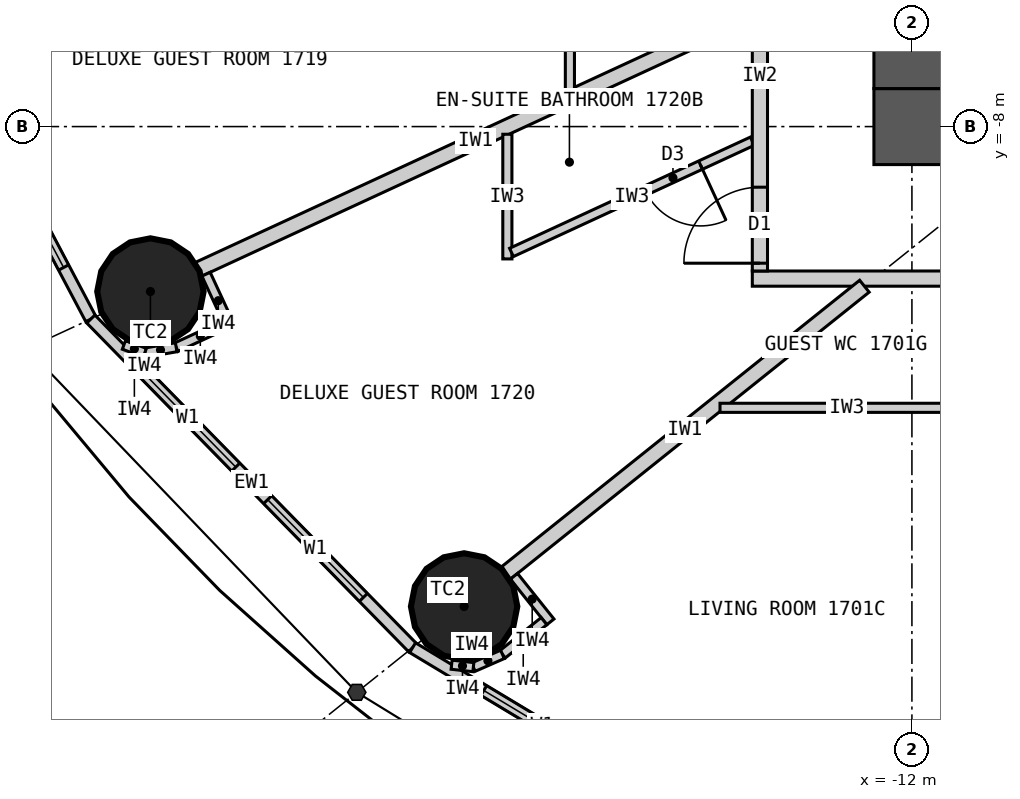
"""IFC4 building model, lengths in metres.
Left out: names, types, materials, properties, quantities, classifications, styles, units other than length and angle.
Written with IfcOpenShell. Run it as: python <this file> out.ifc"""

import sys

from ifc_helpers import new_model, si_unit, direction, frame, frame_2d, origin, origin_2d, place, context, subcontext, project, spatial, rectangle, circle, extrude, element, fill, save


model = new_model("IFC4")
c1 = context("Model", 3, precision=1e-05, world=origin(), true_north=direction((0.0, 1.0)))
c2 = subcontext(c1, "Body", "Model", "MODEL_VIEW")
j1 = project(units=[si_unit("LENGTHUNIT", "METRE"), si_unit("PLANEANGLEUNIT", "RADIAN")], contexts=[c1])
p1 = place(None, origin())
s1 = spatial("IfcSite", under=j1, at=p1, CompositionType="ELEMENT")
p2 = place(p1, origin())
s2 = spatial("IfcBuilding", under=s1, at=p2, CompositionType="ELEMENT")
p3 = place(p2, frame((0.0, 0.0, 70.5)))
s3 = spatial("IfcBuildingStorey", under=s2, at=p3, CompositionType="ELEMENT", Elevation=70.5)
for number, where, z_axis, x_axis in (
    (1, (-22.019, -10.17, 0.0), (0.0, 0.0, 1.0), (1.0, 0.0, 0.0)),
    (2, (-17.892, -14.313, 0.0), (0.0, 0.0, 1.0), (1.0, 0.0, 0.0)),
):
    element("IfcColumn", number, at=place(p3, frame(where, z_axis=z_axis, x_axis=x_axis)), inside=s3, PredefinedType="COLUMN", context=c2, shape_type="SweptSolid", body=[
        extrude(circle(Radius=0.7, at=origin_2d()), origin(), (0.0, 0.0, 1.0), 3.3),
    ])
p4 = place(p3, frame((12.5, -8.0, 0.0), z_axis=(0.0, 0.0, 1.0), x_axis=(-1.0, 0.0, 0.0)))
e3 = element("IfcWall", 3, at=p4, inside=s3, PredefinedType="SHEAR", context=c2, shape_type="SweptSolid", body=[
    extrude(rectangle(XDim=25.0, YDim=1.0, at=frame_2d((12.5, 0.0))), origin(), (0.0, 0.0, 1.0), 3.3),
])
p5 = place(p4, frame((11.2, 0.0, 0.0)))
e4 = element("IfcOpeningElement", 4, at=p5, cuts=e3, PredefinedType="OPENING", context=c2, shape_type="SweptSolid", body=[
    extrude(rectangle(XDim=1.2, YDim=2.2, at=frame_2d((0.6, 1.1))), frame((0.0, 0.51, 0.0), z_axis=(0.0, -1.0, 0.0), x_axis=(1.0, 0.0, 0.0)), (0.0, 0.0, 1.0), 1.02),
])
p6 = place(p4, frame((18.8, 0.0, 0.0)))
e5 = element("IfcOpeningElement", 5, at=p6, cuts=e3, PredefinedType="OPENING", context=c2, shape_type="SweptSolid", body=[
    extrude(rectangle(XDim=0.9, YDim=2.2, at=frame_2d((0.45, 1.1))), frame((0.0, 0.51, 0.0), z_axis=(0.0, -1.0, 0.0), x_axis=(1.0, 0.0, 0.0)), (0.0, 0.0, 1.0), 1.02),
])
p7 = place(p3, frame((-12.0, 7.5, 0.0), z_axis=(0.0, 0.0, 1.0), x_axis=(0.0, -1.0, 0.0)))
e6 = element("IfcWall", 6, at=p7, inside=s3, PredefinedType="SHEAR", context=c2, shape_type="SweptSolid", body=[
    extrude(rectangle(XDim=15.0, YDim=1.0, at=frame_2d((7.5, 0.0))), origin(), (0.0, 0.0, 1.0), 3.3),
])
p8 = place(p7, frame((6.6, 0.0, 0.0)))
e7 = element("IfcOpeningElement", 7, at=p8, cuts=e6, PredefinedType="OPENING", context=c2, shape_type="SweptSolid", body=[
    extrude(rectangle(XDim=1.8, YDim=2.2, at=frame_2d((0.9, 1.1))), frame((0.0, 0.51, 0.0), z_axis=(0.0, -1.0, 0.0), x_axis=(1.0, 0.0, 0.0)), (0.0, 0.0, 1.0), 1.02),
])
p9 = place(p3, frame((-25.482, -5.462, 0.0), z_axis=(0.0, 0.0, 1.0), x_axis=(0.467296867008, -0.884100468321, 0.0)))
e8 = element("IfcWall", 8, at=p9, inside=s3, PredefinedType="ELEMENTEDWALL", context=c2, shape_type="SweptSolid", body=[
    extrude(rectangle(XDim=5.734, YDim=0.15, at=frame_2d((2.867, 0.0))), origin(), (0.0, 0.0, 1.0), 3.12),
])
p10 = place(p9, frame((0.767, 0.0, 0.9)))
e9 = element("IfcOpeningElement", 9, at=p10, cuts=e8, PredefinedType="OPENING", context=c2, shape_type="SweptSolid", body=[
    extrude(rectangle(XDim=1.8, YDim=1.9, at=frame_2d((0.9, 0.95))), frame((0.0, 0.085, 0.0), z_axis=(0.0, -1.0, 0.0), x_axis=(1.0, 0.0, 0.0)), (0.0, 0.0, 1.0), 0.17),
])
p11 = place(p9, frame((3.167, 0.0, 0.9)))
e10 = element("IfcOpeningElement", 10, at=p11, cuts=e8, PredefinedType="OPENING", context=c2, shape_type="SweptSolid", body=[
    extrude(rectangle(XDim=1.8, YDim=1.9, at=frame_2d((0.9, 0.95))), frame((0.0, 0.085, 0.0), z_axis=(0.0, -1.0, 0.0), x_axis=(1.0, 0.0, 0.0)), (0.0, 0.0, 1.0), 0.17),
])
p12 = place(p3, frame((-22.803, -10.532, 0.0), z_axis=(0.0, 0.0, 1.0), x_axis=(0.699602905915, -0.714531856557, 0.0)))
e11 = element("IfcWall", 11, at=p12, inside=s3, PredefinedType="ELEMENTEDWALL", context=c2, shape_type="SweptSolid", body=[
    extrude(rectangle(XDim=6.051, YDim=0.15, at=frame_2d((3.025, 0.0))), origin(), (0.0, 0.0, 1.0), 3.12),
])
p13 = place(p12, frame((0.926, 0.0, 0.9)))
e12 = element("IfcOpeningElement", 12, at=p13, cuts=e11, PredefinedType="OPENING", context=c2, shape_type="SweptSolid", body=[
    extrude(rectangle(XDim=1.8, YDim=1.9, at=frame_2d((0.9, 0.95))), frame((0.0, 0.085, 0.0), z_axis=(0.0, -1.0, 0.0), x_axis=(1.0, 0.0, 0.0)), (0.0, 0.0, 1.0), 0.17),
])
p14 = place(p12, frame((3.325, 0.0, 0.9)))
e13 = element("IfcOpeningElement", 13, at=p14, cuts=e11, PredefinedType="OPENING", context=c2, shape_type="SweptSolid", body=[
    extrude(rectangle(XDim=1.8, YDim=1.9, at=frame_2d((0.9, 0.95))), frame((0.0, 0.085, 0.0), z_axis=(0.0, -1.0, 0.0), x_axis=(1.0, 0.0, 0.0)), (0.0, 0.0, 1.0), 0.17),
])
p15 = place(p3, frame((-18.57, -14.856, 0.0), z_axis=(0.0, 0.0, 1.0), x_axis=(0.856983180864, -0.515344377787, 0.0)))
e14 = element("IfcWall", 14, at=p15, inside=s3, PredefinedType="ELEMENTEDWALL", context=c2, shape_type="SweptSolid", body=[
    extrude(rectangle(XDim=6.386, YDim=0.15, at=frame_2d((3.193, 0.0))), origin(), (0.0, 0.0, 1.0), 3.12),
])
p16 = place(p15, frame((1.093, 0.0, 0.9)))
e15 = element("IfcOpeningElement", 15, at=p16, cuts=e14, PredefinedType="OPENING", context=c2, shape_type="SweptSolid", body=[
    extrude(rectangle(XDim=1.8, YDim=1.9, at=frame_2d((0.9, 0.95))), frame((0.0, 0.085, 0.0), z_axis=(0.0, -1.0, 0.0), x_axis=(1.0, 0.0, 0.0)), (0.0, 0.0, 1.0), 0.17),
])
p17 = place(p15, frame((3.493, 0.0, 0.9)))
e16 = element("IfcOpeningElement", 16, at=p17, cuts=e14, PredefinedType="OPENING", context=c2, shape_type="SweptSolid", body=[
    extrude(rectangle(XDim=1.8, YDim=1.9, at=frame_2d((0.9, 0.95))), frame((0.0, 0.085, 0.0), z_axis=(0.0, -1.0, 0.0), x_axis=(1.0, 0.0, 0.0)), (0.0, 0.0, 1.0), 0.17),
])
p18 = place(p3, frame((14.1, -10.0, 0.0), z_axis=(0.0, 0.0, 1.0), x_axis=(-1.0, 0.0, 0.0)))
e17 = element("IfcWall", 17, at=p18, inside=s3, PredefinedType="PARTITIONING", context=c2, shape_type="SweptSolid", body=[
    extrude(rectangle(XDim=28.2, YDim=0.2, at=frame_2d((14.1, 0.0))), origin(), (0.0, 0.0, 1.0), 3.12),
])
p19 = place(p18, frame((24.165, 0.0, 0.0)))
e18 = element("IfcOpeningElement", 18, at=p19, cuts=e17, PredefinedType="OPENING", context=c2, shape_type="SweptSolid", body=[
    extrude(rectangle(XDim=1.0, YDim=2.2, at=frame_2d((0.5, 1.1))), frame((0.0, 0.11, 0.0), z_axis=(0.0, -1.0, 0.0), x_axis=(1.0, 0.0, 0.0)), (0.0, 0.0, 1.0), 0.22),
])
p20 = place(p18, frame((14.923, 0.0, 0.0)))
e19 = element("IfcOpeningElement", 19, at=p20, cuts=e17, PredefinedType="OPENING", context=c2, shape_type="SweptSolid", body=[
    extrude(rectangle(XDim=1.0, YDim=2.2, at=frame_2d((0.5, 1.1))), frame((0.0, 0.11, 0.0), z_axis=(0.0, -1.0, 0.0), x_axis=(1.0, 0.0, 0.0)), (0.0, 0.0, 1.0), 0.22),
])
p21 = place(p18, frame((3.035, 0.0, 0.0)))
e20 = element("IfcOpeningElement", 20, at=p21, cuts=e17, PredefinedType="OPENING", context=c2, shape_type="SweptSolid", body=[
    extrude(rectangle(XDim=1.0, YDim=2.2, at=frame_2d((0.5, 1.1))), frame((0.0, 0.11, 0.0), z_axis=(0.0, -1.0, 0.0), x_axis=(1.0, 0.0, 0.0)), (0.0, 0.0, 1.0), 0.22),
])
p22 = place(p3, frame((-14.1, -6.512, 0.0), z_axis=(0.0, 0.0, 1.0), x_axis=(-0.907832871056, -0.419332181247, 0.0)))
e21 = element("IfcWall", 21, at=p22, inside=s3, PredefinedType="PARTITIONING", context=c2, shape_type="SweptSolid", body=[
    extrude(rectangle(XDim=8.023, YDim=0.2, at=frame_2d((4.011, 0.0))), origin(), (0.0, 0.0, 1.0), 2.32),
])
p23 = place(p3, frame((-12.625, -10.1, 0.0), z_axis=(0.0, 0.0, 1.0), x_axis=(-0.780892451574, -0.624665493744, 0.0)))
e22 = element("IfcWall", 22, at=p23, inside=s3, PredefinedType="PARTITIONING", context=c2, shape_type="SweptSolid", body=[
    extrude(rectangle(XDim=6.045, YDim=0.2, at=frame_2d((3.022, 0.0))), origin(), (0.0, 0.0, 1.0), 2.32),
])
p24 = place(p3, frame((-7.289, -10.1, 0.0), z_axis=(0.0, 0.0, 1.0), x_axis=(-0.585198353053, -0.810890182197, 0.0)))
e23 = element("IfcWall", 23, at=p24, inside=s3, PredefinedType="PARTITIONING", context=c2, shape_type="SweptSolid", body=[
    extrude(rectangle(XDim=8.36, YDim=0.2, at=frame_2d((4.18, 0.0))), origin(), (0.0, 0.0, 1.0), 2.32),
])
p25 = place(p24, frame((0.72, 0.0, 0.0)))
e24 = element("IfcOpeningElement", 24, at=p25, cuts=e23, PredefinedType="OPENING", context=c2, shape_type="SweptSolid", body=[
    extrude(rectangle(XDim=0.9, YDim=2.1, at=frame_2d((0.45, 1.05))), frame((0.0, 0.11, 0.0), z_axis=(0.0, -1.0, 0.0), x_axis=(1.0, 0.0, 0.0)), (0.0, 0.0, 1.0), 0.22),
])
p26 = place(p3, frame((-14.525, -11.7, 0.0), z_axis=(0.0, 0.0, 1.0), x_axis=(1.0, 0.0, 0.0)))
e25 = element("IfcWall", 25, at=p26, inside=s3, PredefinedType="PARTITIONING", context=c2, shape_type="SweptSolid", body=[
    extrude(rectangle(XDim=3.34, YDim=0.12, at=frame_2d((1.67, 0.0))), origin(), (0.0, 0.0, 1.0), 3.12),
])
p27 = place(p3, frame((-16.5, -7.521, 0.0), z_axis=(0.0, 0.0, 1.0), x_axis=(0.0, 1.0, 0.0)))
e26 = element("IfcWall", 26, at=p27, inside=s3, PredefinedType="PARTITIONING", context=c2, shape_type="SweptSolid", body=[
    extrude(rectangle(XDim=2.749, YDim=0.12, at=frame_2d((1.374, 0.0))), origin(), (0.0, 0.0, 1.0), 3.12),
])
p28 = place(p3, frame((-17.323, -8.101, 0.0), z_axis=(0.0, 0.0, 1.0), x_axis=(0.0, -1.0, 0.0)))
e27 = element("IfcWall", 27, at=p28, inside=s3, PredefinedType="PARTITIONING", context=c2, shape_type="SweptSolid", body=[
    extrude(rectangle(XDim=1.64, YDim=0.12, at=frame_2d((0.82, 0.0))), origin(), (0.0, 0.0, 1.0), 3.12),
])
p29 = place(p3, frame((-14.1, -8.193, 0.0), z_axis=(0.0, 0.0, 1.0), x_axis=(-0.907836493557, -0.419324338628, 0.0)))
e28 = element("IfcWall", 28, at=p29, inside=s3, PredefinedType="PARTITIONING", context=c2, shape_type="SweptSolid", body=[
    extrude(rectangle(XDim=3.49, YDim=0.12, at=frame_2d((1.745, 0.0))), origin(), (0.0, 0.0, 1.0), 3.12),
])
p30 = place(p29, frame((0.75, 0.0, 0.0)))
e29 = element("IfcOpeningElement", 29, at=p30, cuts=e28, PredefinedType="OPENING", context=c2, shape_type="SweptSolid", body=[
    extrude(rectangle(XDim=0.8, YDim=2.1, at=frame_2d((0.4, 1.05))), frame((0.0, 0.07, 0.0), z_axis=(0.0, -1.0, 0.0), x_axis=(1.0, 0.0, 0.0)), (0.0, 0.0, 1.0), 0.14),
])
p31 = place(p3, frame((-14.0, -4.772, 0.0), z_axis=(0.0, 0.0, 1.0), x_axis=(0.0, -1.0, 0.0)))
e30 = element("IfcWall", 30, at=p31, inside=s3, PredefinedType="PARTITIONING", context=c2, shape_type="SweptSolid", body=[
    extrude(rectangle(XDim=5.127, YDim=0.2, at=frame_2d((2.564, 0.0))), origin(), (0.0, 0.0, 1.0), 3.12),
])
p32 = place(p31, frame((4.025, 0.0, 0.0)))
e31 = element("IfcOpeningElement", 31, at=p32, cuts=e30, PredefinedType="OPENING", context=c2, shape_type="SweptSolid", body=[
    extrude(rectangle(XDim=1.0, YDim=2.2, at=frame_2d((0.5, 1.1))), frame((0.0, 0.11, 0.0), z_axis=(0.0, -1.0, 0.0), x_axis=(1.0, 0.0, 0.0)), (0.0, 0.0, 1.0), 0.22),
])
p33 = place(p3, frame((-21.287, -9.942, 0.0), z_axis=(0.0, 0.0, 1.0), x_axis=(0.419259891039, -0.907866258744, 0.0)))
e32 = element("IfcWall", 32, at=p33, inside=s3, PredefinedType="PARTITIONING", context=c2, shape_type="SweptSolid", body=[
    extrude(rectangle(XDim=0.768, YDim=0.12, at=frame_2d((0.384, 0.0))), origin(), (0.0, 0.0, 1.0), 3.12),
])
p34 = place(p3, frame((-21.045, -10.61, 0.0), z_axis=(0.0, 0.0, 1.0), x_axis=(-0.907877701396, -0.419235112208, 0.0)))
e33 = element("IfcWall", 33, at=p34, inside=s3, PredefinedType="PARTITIONING", context=c2, shape_type="SweptSolid", body=[
    extrude(rectangle(XDim=0.7, YDim=0.12, at=frame_2d((0.35, 0.0))), origin(), (0.0, 0.0, 1.0), 3.12),
])
p35 = place(p3, frame((-21.68, -10.903, 0.0), z_axis=(0.0, 0.0, 1.0), x_axis=(-0.985446622073, -0.169985161247, 0.0)))
e34 = element("IfcWall", 34, at=p35, inside=s3, PredefinedType="PARTITIONING", context=c2, shape_type="SweptSolid", body=[
    extrude(rectangle(XDim=0.418, YDim=0.12, at=frame_2d((0.209, 0.0))), origin(), (0.0, 0.0, 1.0), 3.12),
])
p36 = place(p3, frame((-22.092, -10.974, 0.0), z_axis=(0.0, 0.0, 1.0), x_axis=(-0.938428160676, 0.345474437912, 0.0)))
e35 = element("IfcWall", 35, at=p36, inside=s3, PredefinedType="PARTITIONING", context=c2, shape_type="SweptSolid", body=[
    extrude(rectangle(XDim=0.294, YDim=0.12, at=frame_2d((0.147, 0.0))), origin(), (0.0, 0.0, 1.0), 3.12),
])
p37 = place(p3, frame((-17.236, -13.917, 0.0), z_axis=(0.0, 0.0, 1.0), x_axis=(0.624695047554, -0.780868809443, 0.0)))
e36 = element("IfcWall", 36, at=p37, inside=s3, PredefinedType="PARTITIONING", context=c2, shape_type="SweptSolid", body=[
    extrude(rectangle(XDim=0.768, YDim=0.12, at=frame_2d((0.384, 0.0))), origin(), (0.0, 0.0, 1.0), 3.12),
])
p38 = place(p3, frame((-16.841, -14.507, 0.0), z_axis=(0.0, 0.0, 1.0), x_axis=(-0.780902834923, -0.62465251333, 0.0)))
e37 = element("IfcWall", 37, at=p38, inside=s3, PredefinedType="PARTITIONING", context=c2, shape_type="SweptSolid", body=[
    extrude(rectangle(XDim=0.7, YDim=0.12, at=frame_2d((0.35, 0.0))), origin(), (0.0, 0.0, 1.0), 3.12),
])
p39 = place(p3, frame((-17.387, -14.944, 0.0), z_axis=(0.0, 0.0, 1.0), x_axis=(-0.916036698064, -0.401094462441, 0.0)))
e38 = element("IfcWall", 38, at=p39, inside=s3, PredefinedType="PARTITIONING", context=c2, shape_type="SweptSolid", body=[
    extrude(rectangle(XDim=0.418, YDim=0.12, at=frame_2d((0.209, 0.0))), origin(), (0.0, 0.0, 1.0), 3.12),
])
p40 = place(p3, frame((-17.77, -15.112, 0.0), z_axis=(0.0, 0.0, 1.0), x_axis=(-0.993904401174, 0.110245368731, 0.0)))
e39 = element("IfcWall", 39, at=p40, inside=s3, PredefinedType="PARTITIONING", context=c2, shape_type="SweptSolid", body=[
    extrude(rectangle(XDim=0.288, YDim=0.12, at=frame_2d((0.144, 0.0))), origin(), (0.0, 0.0, 1.0), 3.12),
])
p41 = place(p11, origin())
e40 = element("IfcWindow", 40, at=p41, inside=s3, PartitioningType="SINGLE_PANEL", PredefinedType="WINDOW", context=c2, shape_type="SweptSolid", body=[
    extrude(rectangle(XDim=1.8, YDim=1.9, at=frame_2d((0.9, 0.95))), frame((0.0, 0.03, 0.0), z_axis=(0.0, -1.0, 0.0), x_axis=(1.0, 0.0, 0.0)), (0.0, 0.0, 1.0), 0.06),
])
fill(e10, e40)
p42 = place(p13, origin())
e41 = element("IfcWindow", 41, at=p42, inside=s3, PartitioningType="SINGLE_PANEL", PredefinedType="WINDOW", context=c2, shape_type="SweptSolid", body=[
    extrude(rectangle(XDim=1.8, YDim=1.9, at=frame_2d((0.9, 0.95))), frame((0.0, 0.03, 0.0), z_axis=(0.0, -1.0, 0.0), x_axis=(1.0, 0.0, 0.0)), (0.0, 0.0, 1.0), 0.06),
])
fill(e12, e41)
p43 = place(p14, origin())
e42 = element("IfcWindow", 42, at=p43, inside=s3, PartitioningType="SINGLE_PANEL", PredefinedType="WINDOW", context=c2, shape_type="SweptSolid", body=[
    extrude(rectangle(XDim=1.8, YDim=1.9, at=frame_2d((0.9, 0.95))), frame((0.0, 0.03, 0.0), z_axis=(0.0, -1.0, 0.0), x_axis=(1.0, 0.0, 0.0)), (0.0, 0.0, 1.0), 0.06),
])
fill(e13, e42)
p44 = place(p16, origin())
e43 = element("IfcWindow", 43, at=p44, inside=s3, PartitioningType="SINGLE_PANEL", PredefinedType="WINDOW", context=c2, shape_type="SweptSolid", body=[
    extrude(rectangle(XDim=1.8, YDim=1.9, at=frame_2d((0.9, 0.95))), frame((0.0, 0.03, 0.0), z_axis=(0.0, -1.0, 0.0), x_axis=(1.0, 0.0, 0.0)), (0.0, 0.0, 1.0), 0.06),
])
fill(e15, e43)
p45 = place(p30, origin())
e44 = element("IfcDoor", 44, at=p45, inside=s3, OperationType="SINGLE_SWING_LEFT", PredefinedType="DOOR", context=c2, shape_type="SweptSolid", body=[
    extrude(rectangle(XDim=0.8, YDim=2.1, at=frame_2d((0.4, 1.05))), frame((0.0, 0.025, 0.0), z_axis=(0.0, -1.0, 0.0), x_axis=(1.0, 0.0, 0.0)), (0.0, 0.0, 1.0), 0.05),
])
fill(e29, e44)
p46 = place(p32, origin())
e45 = element("IfcDoor", 45, at=p46, inside=s3, OperationType="SINGLE_SWING_RIGHT", PredefinedType="DOOR", context=c2, shape_type="SweptSolid", body=[
    extrude(rectangle(XDim=1.0, YDim=2.2, at=frame_2d((0.5, 1.1))), frame((0.0, 0.025, 0.0), z_axis=(0.0, -1.0, 0.0), x_axis=(1.0, 0.0, 0.0)), (0.0, 0.0, 1.0), 0.05),
])
fill(e31, e45)
save(model, sys.argv[1])
